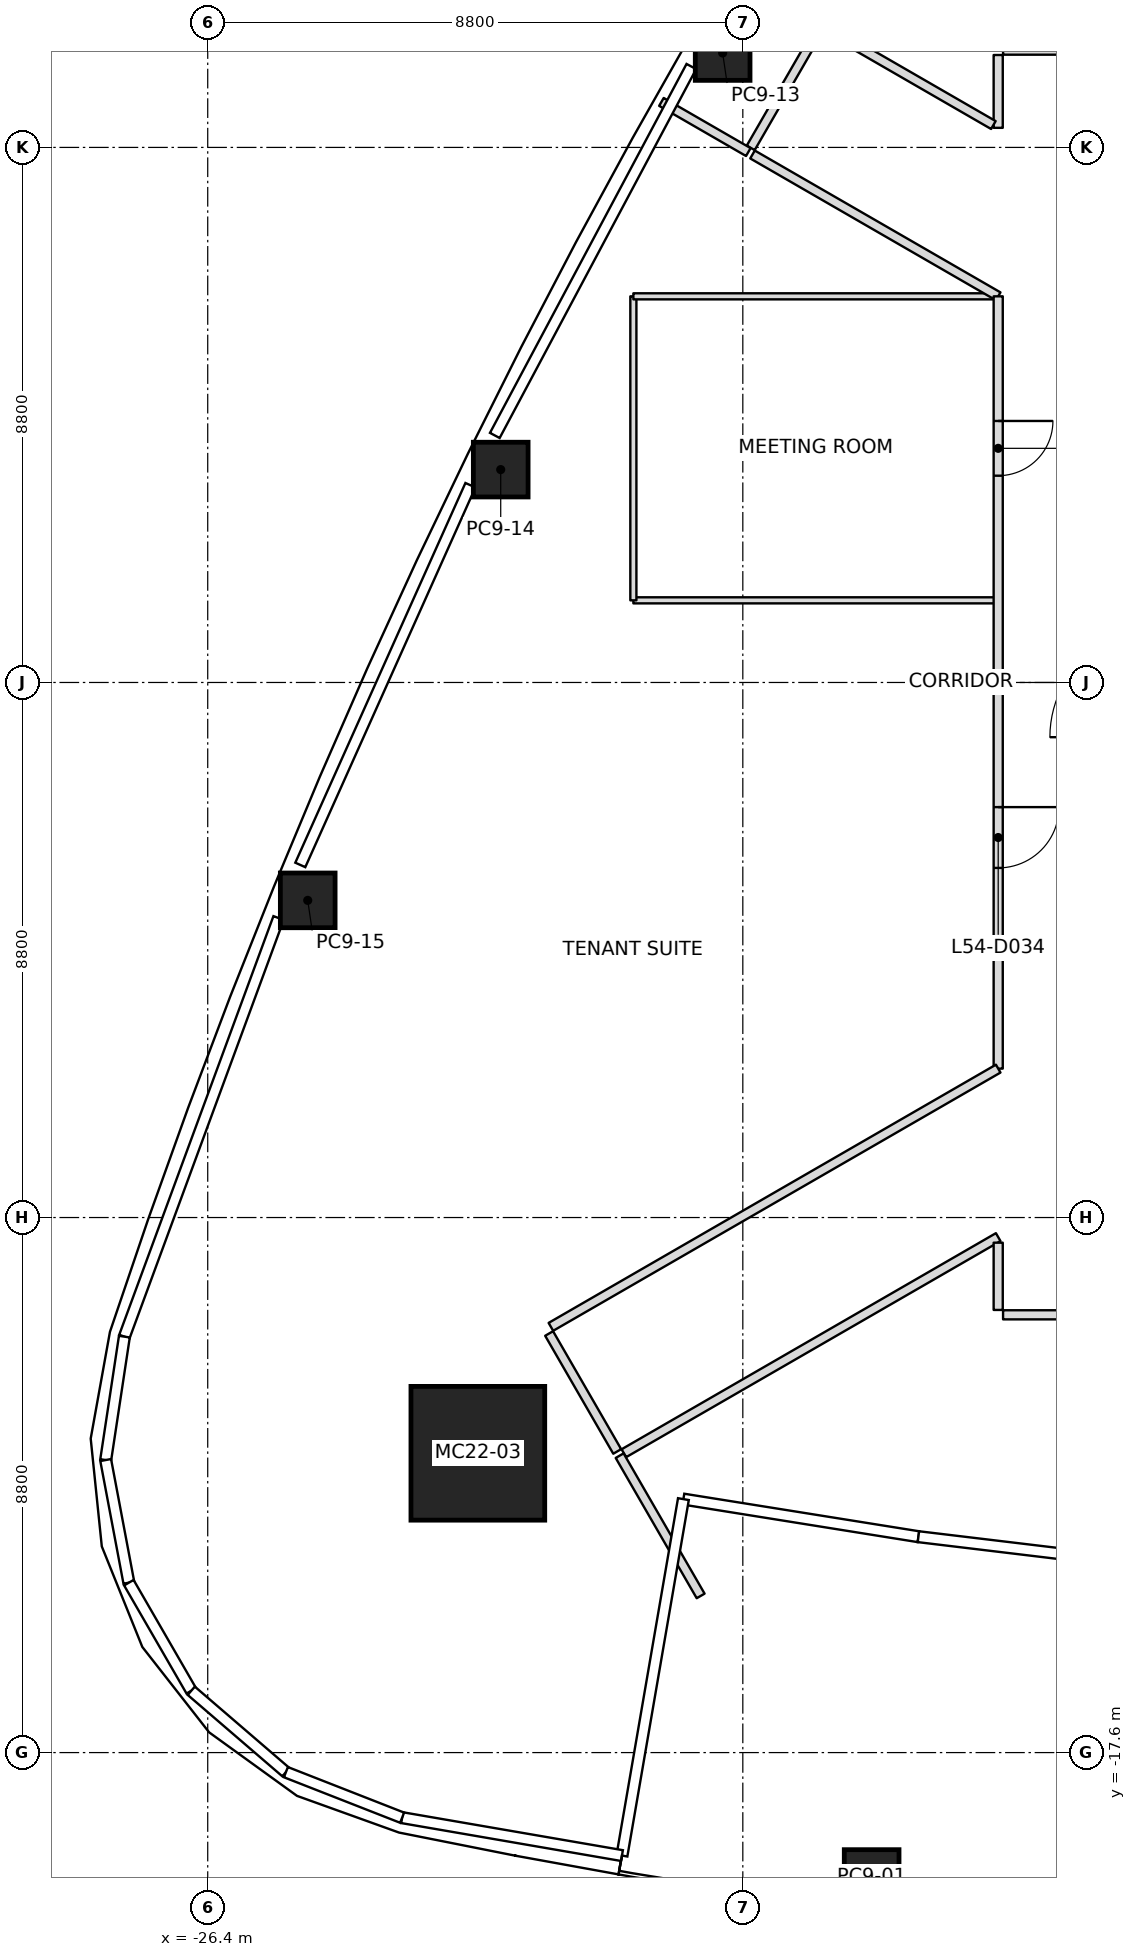
"""IFC4 building model, lengths in metres.
Left out: names, types, materials, properties, quantities, classifications, styles, units other than length and angle.
Written with IfcOpenShell. Run it as: python <this file> out.ifc"""

import sys

from ifc_helpers import new_model, si_unit, direction, frame, frame_2d, origin, origin_2d, place, context, subcontext, project, spatial, rectangle, extrude, element, fill, save


model = new_model("IFC4")
c1 = context("Model", 3, precision=1e-05, world=origin(), true_north=direction((0.0, 1.0)))
c2 = subcontext(c1, "Body", "Model", "MODEL_VIEW")
j1 = project(units=[si_unit("LENGTHUNIT", "METRE"), si_unit("PLANEANGLEUNIT", "RADIAN")], contexts=[c1])
p1 = place(None, origin())
s1 = spatial("IfcSite", under=j1, at=p1, CompositionType="ELEMENT")
p2 = place(p1, origin())
s2 = spatial("IfcBuilding", under=s1, at=p2, CompositionType="ELEMENT")
p3 = place(p2, frame((0.0, 0.0, 243.0)))
s3 = spatial("IfcBuildingStorey", under=s2, at=p3, CompositionType="ELEMENT", Elevation=243.0)
p4 = place(p3, frame((-21.958, -12.677, 0.0), z_axis=(0.027817649629, 0.016104955049, 0.999483270892), x_axis=(0.999613014306, -0.000448175434, -0.027814039075)))
e1 = element("IfcColumn", 1, at=p4, inside=s3, PredefinedType="COLUMN", context=c2, shape_type="SweptSolid", body=[
    extrude(rectangle(XDim=2.2, YDim=2.2, at=origin_2d()), origin(), (0.0, 0.0, 1.0), 4.002),
])
p5 = place(p3, frame((-15.481, -19.647, 0.0), z_axis=(0.017513449354, 0.010434842647, 0.99979217498), x_axis=(-0.990536347389, 0.136323245156, 0.015928506883)))
e2 = element("IfcColumn", 2, at=p5, inside=s3, PredefinedType="COLUMN", context=c2, shape_type="SweptSolid", body=[
    extrude(rectangle(XDim=0.9, YDim=0.9, at=origin_2d()), origin(), (0.0, 0.0, 1.0), 4.001),
])
p6 = place(p3, frame((-17.932, 10.353, 0.0), z_axis=(0.009887052741, -0.005675900648, 0.999935013058), x_axis=(0.49997556095, 0.866039512773, -2.7732311e-05)))
e3 = element("IfcColumn", 3, at=p6, inside=s3, PredefinedType="COLUMN", context=c2, shape_type="SweptSolid", body=[
    extrude(rectangle(XDim=0.9, YDim=0.9, at=origin_2d()), origin(), (0.0, 0.0, 1.0), 4.0),
])
p7 = place(p3, frame((-21.582, 3.501, 0.0), z_axis=(0.014036676147, 0.001952928855, 0.999899573853), x_axis=(0.439698349735, 0.898110533027, -0.007926645355)))
e4 = element("IfcColumn", 4, at=p7, inside=s3, PredefinedType="COLUMN", context=c2, shape_type="SweptSolid", body=[
    extrude(rectangle(XDim=0.9, YDim=0.9, at=origin_2d()), origin(), (0.0, 0.0, 1.0), 4.0),
])
p8 = place(p3, frame((-24.755, -3.584, 0.0), z_axis=(0.017818554314, 0.009946658744, 0.999791759869), x_axis=(0.37737522462, 0.925923289351, -0.015937442734)))
e5 = element("IfcColumn", 5, at=p8, inside=s3, PredefinedType="COLUMN", context=c2, shape_type="SweptSolid", body=[
    extrude(rectangle(XDim=0.9, YDim=0.9, at=origin_2d()), origin(), (0.0, 0.0, 1.0), 4.001),
])
p9 = place(p3, frame((-19.625, -12.717, 0.0), z_axis=(0.0, 0.0, 1.0), x_axis=(0.500002746266, -0.866023818221, 0.0)))
e6 = element("IfcWall", 6, at=p9, inside=s3, PredefinedType="PARTITIONING", context=c2, shape_type="SweptSolid", body=[
    extrude(rectangle(XDim=2.664, YDim=0.15, at=frame_2d((1.332, 0.0))), origin(), (0.0, 0.0, 1.0), 3.45),
])
p10 = place(p3, frame((-17.51, 8.724, 0.0), z_axis=(0.0, 0.0, 1.0), x_axis=(-0.866003217194, 0.500038426333, 0.0)))
e7 = element("IfcWall", 7, at=p10, inside=s3, PredefinedType="PARTITIONING", context=c2, shape_type="SweptSolid", body=[
    extrude(rectangle(XDim=1.65, YDim=0.15, at=frame_2d((0.825, 0.0))), origin(), (0.0, 0.0, 1.0), 3.234),
])
p11 = place(p3, frame((-20.786, -10.707, 0.0), z_axis=(0.0, 0.0, 1.0), x_axis=(0.500030632641, -0.866007717299, 0.0)))
e8 = element("IfcWall", 8, at=p11, inside=s3, PredefinedType="PARTITIONING", context=c2, shape_type="SweptSolid", body=[
    extrude(rectangle(XDim=2.24, YDim=0.15, at=frame_2d((1.12, 0.0))), origin(), (0.0, 0.0, 1.0), 3.233),
])
p12 = place(p3, frame((-17.44, 8.684, 0.0), z_axis=(0.0, 0.0, 1.0), x_axis=(0.866028733576, -0.499994232587, 0.0)))
e9 = element("IfcWall", 9, at=p12, inside=s3, PredefinedType="PARTITIONING", context=c2, shape_type="SweptSolid", body=[
    extrude(rectangle(XDim=4.666, YDim=0.15, at=frame_2d((2.333, 0.0))), origin(), (0.0, 0.0, 1.0), 3.45),
])
p13 = place(p3, frame((-13.4, 6.351, 0.0), z_axis=(0.0, 0.0, 1.0), x_axis=(0.0, -1.0, 0.0)))
e10 = element("IfcWall", 10, at=p13, inside=s3, PredefinedType="PARTITIONING", context=c2, shape_type="SweptSolid", body=[
    extrude(rectangle(XDim=12.702, YDim=0.15, at=frame_2d((6.351, 0.0))), origin(), (0.0, 0.0, 1.0), 3.317),
])
p14 = place(p13, frame((2.05, 0.0, 0.0)))
e11 = element("IfcOpeningElement", 11, at=p14, cuts=e10, PredefinedType="OPENING", context=c2, shape_type="SweptSolid", body=[
    extrude(rectangle(XDim=0.9, YDim=2.1, at=frame_2d((0.45, 1.05))), frame((0.0, 0.075, 0.0), z_axis=(0.0, -1.0, 0.0), x_axis=(1.0, 0.0, 0.0)), (0.0, 0.0, 1.0), 0.15),
])
p15 = place(p13, frame((8.401, 0.0, 0.0)))
e12 = element("IfcOpeningElement", 12, at=p15, cuts=e10, PredefinedType="OPENING", context=c2, shape_type="SweptSolid", body=[
    extrude(rectangle(XDim=1.0, YDim=2.1, at=frame_2d((0.5, 1.05))), frame((0.0, 0.075, 0.0), z_axis=(0.0, -1.0, 0.0), x_axis=(1.0, 0.0, 0.0)), (0.0, 0.0, 1.0), 0.15),
])
p16 = place(p3, frame((-13.4, -6.351, 0.0), z_axis=(0.0, 0.0, 1.0), x_axis=(-0.866034343295, -0.499984515995, 0.0)))
e13 = element("IfcWall", 13, at=p16, inside=s3, PredefinedType="PARTITIONING", context=c2, shape_type="SweptSolid", body=[
    extrude(rectangle(XDim=8.494, YDim=0.15, at=frame_2d((4.247, 0.0))), origin(), (0.0, 0.0, 1.0), 3.317),
])
p17 = place(p3, frame((-19.556, -12.677, 0.0), z_axis=(0.0, 0.0, 1.0), x_axis=(0.866026024469, 0.499998924941, 0.0)))
e14 = element("IfcWall", 14, at=p17, inside=s3, PredefinedType="PARTITIONING", context=c2, shape_type="SweptSolid", body=[
    extrude(rectangle(XDim=7.109, YDim=0.15, at=frame_2d((3.554, 0.0))), origin(), (0.0, 0.0, 1.0), 3.233),
])
p18 = place(p3, frame((-13.4, -9.214, 0.0), z_axis=(0.0, 0.0, 1.0), x_axis=(0.0, -1.0, 0.0)))
e15 = element("IfcWall", 15, at=p18, inside=s3, PredefinedType="PARTITIONING", context=c2, shape_type="SweptSolid", body=[
    extrude(rectangle(XDim=1.106, YDim=0.15, at=frame_2d((0.553, 0.0))), origin(), (0.0, 0.0, 1.0), 3.233),
])
p19 = place(p3, frame((-16.35, 10.733, 0.0), z_axis=(0.0, 0.0, 1.0), x_axis=(-0.49994888933, -0.866054910533, 0.0)))
e16 = element("IfcWall", 16, at=p19, inside=s3, PredefinedType="PARTITIONING", context=c2, shape_type="SweptSolid", body=[
    extrude(rectangle(XDim=2.24, YDim=0.15, at=frame_2d((1.12, 0.0))), origin(), (0.0, 0.0, 1.0), 3.45),
])
p20 = place(p3, frame((-13.4, 10.32, 0.0), z_axis=(0.0, 0.0, 1.0), x_axis=(0.0, -1.0, 0.0)))
e17 = element("IfcWall", 17, at=p20, inside=s3, PredefinedType="PARTITIONING", context=c2, shape_type="SweptSolid", body=[
    extrude(rectangle(XDim=1.198, YDim=0.15, at=frame_2d((0.599, 0.0))), origin(), (0.0, 0.0, 1.0), 3.45),
])
p21 = place(p3, frame((-13.479, 9.168, 0.0), z_axis=(0.0, 0.0, 1.0), x_axis=(-0.866019818373, 0.500009674092, 0.0)))
e18 = element("IfcWall", 18, at=p21, inside=s3, PredefinedType="PARTITIONING", context=c2, shape_type="SweptSolid", body=[
    extrude(rectangle(XDim=3.188, YDim=0.15, at=frame_2d((1.594, 0.0))), origin(), (0.0, 0.0, 1.0), 3.45),
])
p22 = place(p3, frame((-13.32, -10.4, 0.0), z_axis=(0.0, 0.0, 1.0), x_axis=(1.0, 0.0, 0.0)))
e19 = element("IfcWall", 19, at=p22, inside=s3, PredefinedType="PARTITIONING", context=c2, shape_type="SweptSolid", body=[
    extrude(rectangle(XDim=12.12, YDim=0.15, at=frame_2d((6.06, 0.0))), origin(), (0.0, 0.0, 1.0), 3.317),
])
p23 = place(p22, frame((5.52, 0.0, 0.0)))
e20 = element("IfcOpeningElement", 20, at=p23, cuts=e19, PredefinedType="OPENING", context=c2, shape_type="SweptSolid", body=[
    extrude(rectangle(XDim=1.0, YDim=2.1, at=frame_2d((0.5, 1.05))), frame((0.0, 0.075, 0.0), z_axis=(0.0, -1.0, 0.0), x_axis=(1.0, 0.0, 0.0)), (0.0, 0.0, 1.0), 0.15),
])
p24 = place(p3, frame((-1.2, 10.4, 0.0), z_axis=(0.0, 0.0, 1.0), x_axis=(-1.0, 0.0, 0.0)))
e21 = element("IfcWall", 21, at=p24, inside=s3, PredefinedType="PARTITIONING", context=c2, shape_type="SweptSolid", body=[
    extrude(rectangle(XDim=12.12, YDim=0.15, at=frame_2d((6.06, 0.0))), origin(), (0.0, 0.0, 1.0), 3.317),
])
p25 = place(p24, frame((1.65, 0.0, 0.0)))
e22 = element("IfcOpeningElement", 22, at=p25, cuts=e21, PredefinedType="OPENING", context=c2, shape_type="SweptSolid", body=[
    extrude(rectangle(XDim=0.9, YDim=2.1, at=frame_2d((0.45, 1.05))), frame((0.0, 0.075, 0.0), z_axis=(0.0, -1.0, 0.0), x_axis=(1.0, 0.0, 0.0)), (0.0, 0.0, 1.0), 0.15),
])
p26 = place(p24, frame((7.75, 0.0, 0.0)))
e23 = element("IfcOpeningElement", 23, at=p26, cuts=e21, PredefinedType="OPENING", context=c2, shape_type="SweptSolid", body=[
    extrude(rectangle(XDim=1.0, YDim=2.1, at=frame_2d((0.5, 1.05))), frame((0.0, 0.075, 0.0), z_axis=(0.0, -1.0, 0.0), x_axis=(1.0, 0.0, 0.0)), (0.0, 0.0, 1.0), 0.15),
])
p27 = place(p3, frame((-13.43, 1.351, 0.0), z_axis=(0.0, 0.0, 1.0), x_axis=(-1.0, 0.0, 0.0)))
e24 = element("IfcWall", 24, at=p27, inside=s3, PredefinedType="PARTITIONING", context=c2, shape_type="SweptSolid", body=[
    extrude(rectangle(XDim=5.97, YDim=0.1, at=frame_2d((2.985, 0.0))), origin(), (0.0, 0.0, 1.0), 3.45),
])
p28 = place(p3, frame((-19.4, 1.351, 0.0), z_axis=(0.0, 0.0, 1.0), x_axis=(0.0, 1.0, 0.0)))
e25 = element("IfcWall", 25, at=p28, inside=s3, PredefinedType="PARTITIONING", context=c2, shape_type="SweptSolid", body=[
    extrude(rectangle(XDim=5.0, YDim=0.1, at=frame_2d((2.5, 0.0))), origin(), (0.0, 0.0, 1.0), 3.393),
])
p29 = place(p3, frame((-19.4, 6.351, 0.0), z_axis=(0.0, 0.0, 1.0), x_axis=(1.0, 0.0, 0.0)))
e26 = element("IfcWall", 26, at=p29, inside=s3, PredefinedType="PARTITIONING", context=c2, shape_type="SweptSolid", body=[
    extrude(rectangle(XDim=5.94, YDim=0.1, at=frame_2d((2.97, 0.0))), origin(), (0.0, 0.0, 1.0), 3.443),
])
p30 = place(p14, origin())
e27 = element("IfcDoor", 27, at=p30, inside=s3, OperationType="SINGLE_SWING_LEFT", PredefinedType="DOOR", context=c2, shape_type="SweptSolid", body=[
    extrude(rectangle(XDim=0.9, YDim=2.1, at=frame_2d((0.45, 1.05))), frame((0.0, 0.025, 0.0), z_axis=(0.0, -1.0, 0.0), x_axis=(1.0, 0.0, 0.0)), (0.0, 0.0, 1.0), 0.05),
])
fill(e11, e27)
p31 = place(p15, origin())
e28 = element("IfcDoor", 28, at=p31, inside=s3, OperationType="SINGLE_SWING_LEFT", PredefinedType="DOOR", context=c2, shape_type="SweptSolid", body=[
    extrude(rectangle(XDim=1.0, YDim=2.1, at=frame_2d((0.5, 1.05))), frame((0.0, 0.025, 0.0), z_axis=(0.0, -1.0, 0.0), x_axis=(1.0, 0.0, 0.0)), (0.0, 0.0, 1.0), 0.05),
])
fill(e12, e28)
save(model, sys.argv[1])
